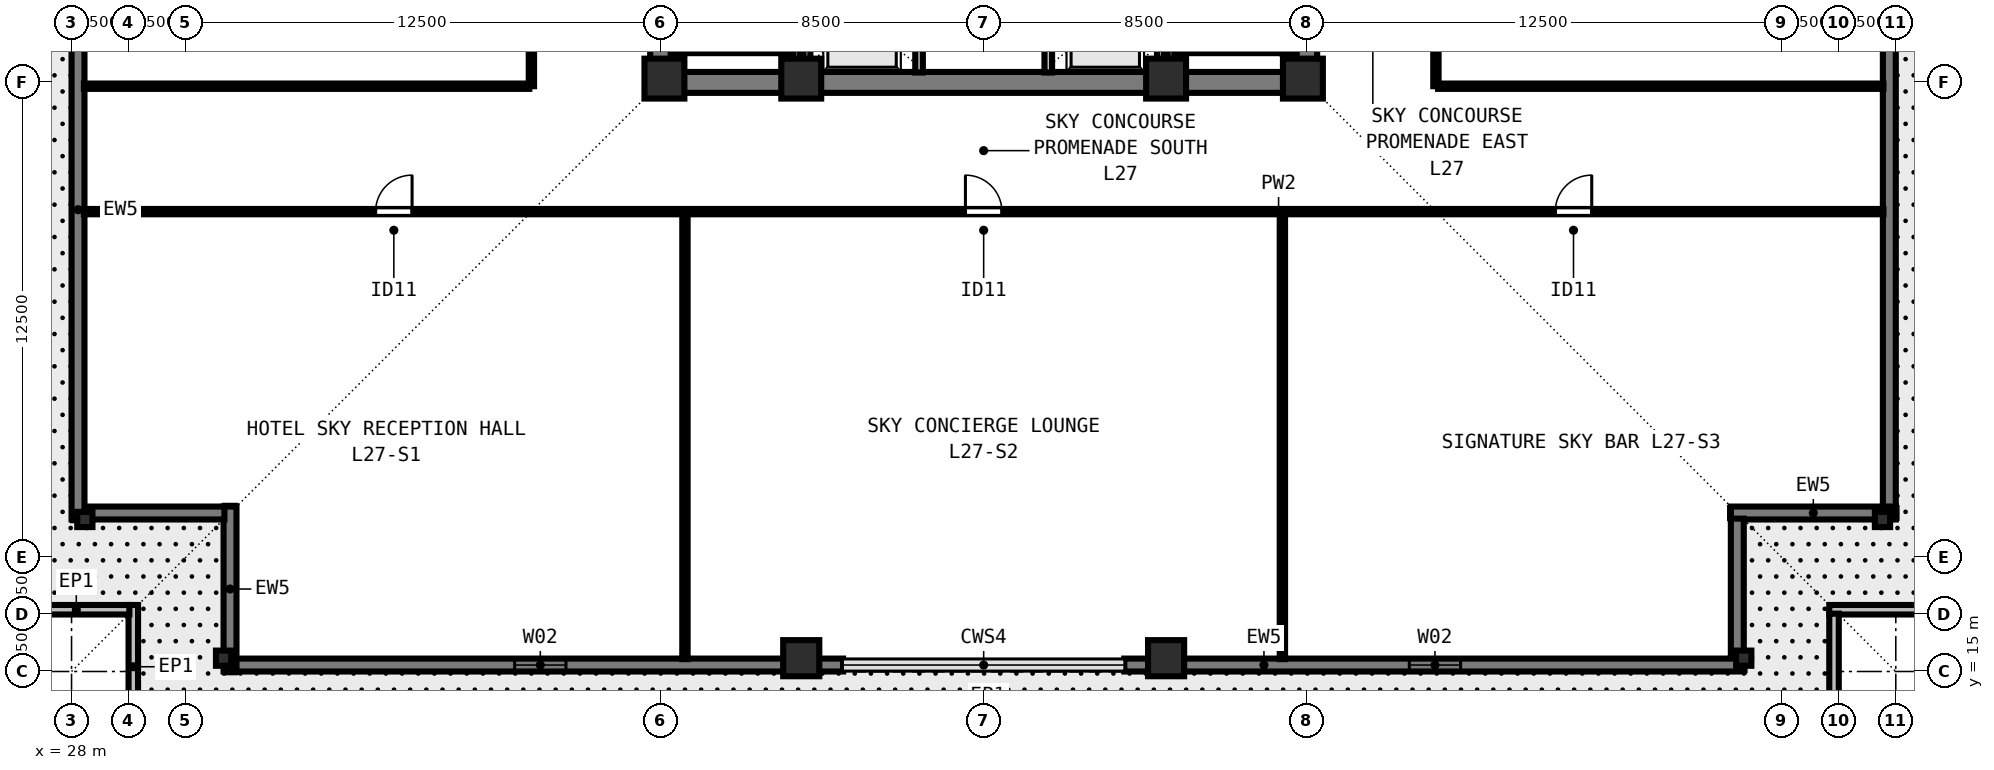
"""IFC4 building model, lengths in metres.
Left out: names, types, materials, properties, quantities, classifications, styles, units other than length and angle.
Written with IfcOpenShell. Run it as: python <this file> out.ifc"""

import sys

from ifc_helpers import new_model, si_unit, direction, frame, frame_2d, origin, origin_2d, place, context, subcontext, project, spatial, rectangle, i_section, extrude, element, fill, save


model = new_model("IFC4")
c1 = context("Model", 3, precision=1e-05, world=origin(), true_north=direction((0.0, 1.0)))
c2 = subcontext(c1, "Body", "Model", "MODEL_VIEW")
j1 = project(units=[si_unit("LENGTHUNIT", "METRE"), si_unit("PLANEANGLEUNIT", "RADIAN")], contexts=[c1])
p1 = place(None, origin())
s1 = spatial("IfcSite", under=j1, at=p1, CompositionType="ELEMENT")
p2 = place(p1, origin())
s2 = spatial("IfcBuilding", under=s1, at=p2, CompositionType="ELEMENT")
p3 = place(p2, frame((0.0, 0.0, 101.5)))
s3 = spatial("IfcBuildingStorey", under=s2, at=p3, CompositionType="ELEMENT", Elevation=101.5)
for number, where, z_axis, x_axis in (
    (1, (43.6, 30.6, 0.0), (0.0, 0.0, 1.0), (1.0, 0.0, 0.0)),
    (2, (47.2, 30.6, 0.0), (0.0, 0.0, 1.0), (1.0, 0.0, 0.0)),
    (3, (56.8, 30.6, 0.0), (0.0, 0.0, 1.0), (1.0, 0.0, 0.0)),
    (4, (60.4, 30.6, 0.0), (0.0, 0.0, 1.0), (1.0, 0.0, 0.0)),
):
    element("IfcColumn", number, at=place(p3, frame(where, z_axis=z_axis, x_axis=x_axis)), inside=s3, PredefinedType="COLUMN", context=c2, shape_type="SweptSolid", body=[
        extrude(rectangle(XDim=1.05, YDim=1.05, at=origin_2d()), origin(), (0.0, 0.0, 1.0), 4.5),
    ])
p4 = place(p3, frame((32.0, 15.35, 0.0), z_axis=(0.0, 0.0, 1.0), x_axis=(1.0, 0.0, 0.0)))
e5 = element("IfcColumn", 5, at=p4, inside=s3, PredefinedType="COLUMN", context=c2, shape_type="SweptSolid", body=[
    extrude(i_section(OverallWidth=0.4, OverallDepth=0.4, WebThickness=0.022, FlangeThickness=0.036, at=origin_2d()), origin(), (0.0, 0.0, 1.0), 4.5),
])
for number, where, z_axis, x_axis in (
    (6, (47.2, 15.35, 0.0), (0.0, 0.0, 1.0), (1.0, 0.0, 0.0)),
    (7, (56.8, 15.35, 0.0), (0.0, 0.0, 1.0), (1.0, 0.0, 0.0)),
):
    element("IfcColumn", number, at=place(p3, frame(where, z_axis=z_axis, x_axis=x_axis)), inside=s3, PredefinedType="COLUMN", context=c2, shape_type="SweptSolid", body=[
        extrude(rectangle(XDim=0.95, YDim=0.95, at=origin_2d()), origin(), (0.0, 0.0, 1.0), 4.5),
    ])
for number, where, z_axis, x_axis in (
    (8, (72.0, 15.35, 0.0), (0.0, 0.0, 1.0), (1.0, 0.0, 0.0)),
    (9, (75.65, 19.0, 0.0), (0.0, 0.0, 1.0), (0.0, 1.0, 0.0)),
    (10, (28.35, 19.0, 0.0), (0.0, 0.0, 1.0), (0.0, 1.0, 0.0)),
):
    element("IfcColumn", number, at=place(p3, frame(where, z_axis=z_axis, x_axis=x_axis)), inside=s3, PredefinedType="COLUMN", context=c2, shape_type="SweptSolid", body=[
        extrude(i_section(OverallWidth=0.4, OverallDepth=0.4, WebThickness=0.022, FlangeThickness=0.036, at=origin_2d()), origin(), (0.0, 0.0, 1.0), 4.5),
    ])
p5 = place(p3, frame((29.625, 13.5, 0.0), z_axis=(0.0, 0.0, 1.0), x_axis=(0.0, 1.0, 0.0)))
e11 = element("IfcWall", 11, at=p5, inside=s3, PredefinedType="PARAPET", context=c2, shape_type="SweptSolid", body=[
    extrude(rectangle(XDim=3.25, YDim=0.25, at=frame_2d((1.625, 0.0))), origin(), (0.0, 0.0, 1.0), 1.15),
])
p6 = place(p3, frame((29.522, 16.625, 0.0), z_axis=(0.0, 0.0, 1.0), x_axis=(-1.0, 0.0, 0.0)))
e12 = element("IfcWall", 12, at=p6, inside=s3, PredefinedType="PARAPET", context=c2, shape_type="SweptSolid", body=[
    extrude(rectangle(XDim=2.794, YDim=0.25, at=frame_2d((1.397, 0.0))), origin(), (0.0, 0.0, 1.0), 1.15),
])
p7 = place(p3, frame((77.5, 16.625, 0.0), z_axis=(0.0, 0.0, 1.0), x_axis=(-1.0, 0.0, 0.0)))
e13 = element("IfcWall", 13, at=p7, inside=s3, PredefinedType="PARAPET", context=c2, shape_type="SweptSolid", body=[
    extrude(rectangle(XDim=3.25, YDim=0.25, at=frame_2d((1.625, 0.0))), origin(), (0.0, 0.0, 1.0), 1.15),
])
p8 = place(p3, frame((74.375, 16.522, 0.0), z_axis=(0.0, 0.0, 1.0), x_axis=(0.0, -1.0, 0.0)))
e14 = element("IfcWall", 14, at=p8, inside=s3, PredefinedType="PARAPET", context=c2, shape_type="SweptSolid", body=[
    extrude(rectangle(XDim=2.794, YDim=0.25, at=frame_2d((1.397, 0.0))), origin(), (0.0, 0.0, 1.0), 1.15),
])
p9 = place(p3, frame((75.83, 35.3, 0.0), z_axis=(0.0, 0.0, 1.0), x_axis=(0.0, -1.0, 0.0)))
e15 = element("IfcWall", 15, at=p9, inside=s3, PredefinedType="SOLIDWALL", context=c2, shape_type="SweptSolid", body=[
    extrude(rectangle(XDim=15.982, YDim=0.34, at=frame_2d((7.991, 0.0))), origin(), (0.0, 0.0, 1.0), 4.28),
])
p10 = place(p3, frame((76.0, 19.17, 0.0), z_axis=(0.0, 0.0, 1.0), x_axis=(-1.0, 0.0, 0.0)))
e16 = element("IfcWall", 16, at=p10, inside=s3, PredefinedType="SOLIDWALL", context=c2, shape_type="SweptSolid", body=[
    extrude(rectangle(XDim=4.34, YDim=0.34, at=frame_2d((2.17, 0.0))), origin(), (0.0, 0.0, 1.0), 4.28),
])
p11 = place(p3, frame((71.83, 19.022, 0.0), z_axis=(0.0, 0.0, 1.0), x_axis=(0.0, -1.0, 0.0)))
e17 = element("IfcWall", 17, at=p11, inside=s3, PredefinedType="SOLIDWALL", context=c2, shape_type="SweptSolid", body=[
    extrude(rectangle(XDim=3.704, YDim=0.34, at=frame_2d((1.852, 0.0))), origin(), (0.0, 0.0, 1.0), 4.28),
])
p12 = place(p3, frame((72.0, 15.17, 0.0), z_axis=(0.0, 0.0, 1.0), x_axis=(-1.0, 0.0, 0.0)))
e18 = element("IfcWall", 18, at=p12, inside=s3, PredefinedType="SOLIDWALL", context=c2, shape_type="SweptSolid", body=[
    extrude(rectangle(XDim=16.3, YDim=0.34, at=frame_2d((8.15, 0.0))), origin(), (0.0, 0.0, 1.0), 4.28),
])
p13 = place(p12, frame((7.45, 0.0, 0.8)))
e19 = element("IfcOpeningElement", 19, at=p13, cuts=e18, PredefinedType="OPENING", context=c2, shape_type="SweptSolid", body=[
    extrude(rectangle(XDim=1.35, YDim=1.8, at=frame_2d((0.675, 0.9))), frame((0.0, 0.18, 0.0), z_axis=(0.0, -1.0, 0.0), x_axis=(1.0, 0.0, 0.0)), (0.0, 0.0, 1.0), 0.36),
])
p14 = place(p3, frame((48.3, 15.17, 0.0), z_axis=(0.0, 0.0, 1.0), x_axis=(-1.0, 0.0, 0.0)))
e20 = element("IfcWall", 20, at=p14, inside=s3, PredefinedType="SOLIDWALL", context=c2, shape_type="SweptSolid", body=[
    extrude(rectangle(XDim=15.982, YDim=0.34, at=frame_2d((7.991, 0.0))), origin(), (0.0, 0.0, 1.0), 4.28),
])
p15 = place(p14, frame((7.291, 0.0, 0.8)))
e21 = element("IfcOpeningElement", 21, at=p15, cuts=e20, PredefinedType="OPENING", context=c2, shape_type="SweptSolid", body=[
    extrude(rectangle(XDim=1.35, YDim=1.8, at=frame_2d((0.675, 0.9))), frame((0.0, 0.18, 0.0), z_axis=(0.0, -1.0, 0.0), x_axis=(1.0, 0.0, 0.0)), (0.0, 0.0, 1.0), 0.36),
])
p16 = place(p3, frame((32.17, 15.0, 0.0), z_axis=(0.0, 0.0, 1.0), x_axis=(0.0, 1.0, 0.0)))
e22 = element("IfcWall", 22, at=p16, inside=s3, PredefinedType="SOLIDWALL", context=c2, shape_type="SweptSolid", body=[
    extrude(rectangle(XDim=4.34, YDim=0.34, at=frame_2d((2.17, 0.0))), origin(), (0.0, 0.0, 1.0), 4.28),
])
p17 = place(p3, frame((32.022, 19.17, 0.0), z_axis=(0.0, 0.0, 1.0), x_axis=(-1.0, 0.0, 0.0)))
e23 = element("IfcWall", 23, at=p17, inside=s3, PredefinedType="SOLIDWALL", context=c2, shape_type="SweptSolid", body=[
    extrude(rectangle(XDim=3.704, YDim=0.34, at=frame_2d((1.852, 0.0))), origin(), (0.0, 0.0, 1.0), 4.28),
])
p18 = place(p3, frame((28.17, 19.0, 0.0), z_axis=(0.0, 0.0, 1.0), x_axis=(0.0, 1.0, 0.0)))
e24 = element("IfcWall", 24, at=p18, inside=s3, PredefinedType="SOLIDWALL", context=c2, shape_type="SweptSolid", body=[
    extrude(rectangle(XDim=16.3, YDim=0.34, at=frame_2d((8.15, 0.0))), origin(), (0.0, 0.0, 1.0), 4.28),
])
p19 = place(p3, frame((43.225, 30.5, 0.0), z_axis=(0.0, 0.0, 1.0), x_axis=(1.0, 0.0, 0.0)))
e25 = element("IfcWall", 25, at=p19, inside=s3, PredefinedType="SHEAR", context=c2, shape_type="SweptSolid", body=[
    extrude(rectangle(XDim=17.55, YDim=0.55, at=frame_2d((8.775, 0.0))), origin(), (0.0, 0.0, 1.0), 4.28),
])
for number, where, z_axis, x_axis in (
    (26, (43.5, 30.765, 0.0), (0.0, 0.0, 1.0), (0.0, 1.0, 0.0)),
    (27, (60.5, 30.765, 0.0), (0.0, 0.0, 1.0), (0.0, 1.0, 0.0)),
):
    element("IfcWall", number, at=place(p3, frame(where, z_axis=z_axis, x_axis=x_axis)), inside=s3, PredefinedType="SHEAR", context=c2, shape_type="SweptSolid", body=[
        extrude(rectangle(XDim=7.985, YDim=0.55, at=frame_2d((3.993, 0.0))), origin(), (0.0, 0.0, 1.0), 4.28),
    ])
p20 = place(p3, frame((50.3, 30.76, 0.0), z_axis=(0.0, 0.0, 1.0), x_axis=(0.0, 1.0, 0.0)))
e28 = element("IfcWall", 28, at=p20, inside=s3, PredefinedType="SOLIDWALL", context=c2, shape_type="SweptSolid", body=[
    extrude(rectangle(XDim=7.855, YDim=0.2, at=frame_2d((3.927, 0.0))), origin(), (0.0, 0.0, 1.0), 4.28),
])
p21 = place(p20, frame((0.79, 0.0, 0.0)))
e29 = element("IfcOpeningElement", 29, at=p21, cuts=e28, PredefinedType="OPENING", context=c2, shape_type="SweptSolid", body=[
    extrude(rectangle(XDim=1.1, YDim=2.2, at=frame_2d((0.55, 1.1))), frame((0.0, 0.11, 0.0), z_axis=(0.0, -1.0, 0.0), x_axis=(1.0, 0.0, 0.0)), (0.0, 0.0, 1.0), 0.22),
])
p22 = place(p20, frame((3.49, 0.0, 0.0)))
e30 = element("IfcOpeningElement", 30, at=p22, cuts=e28, PredefinedType="OPENING", context=c2, shape_type="SweptSolid", body=[
    extrude(rectangle(XDim=1.1, YDim=2.2, at=frame_2d((0.55, 1.1))), frame((0.0, 0.11, 0.0), z_axis=(0.0, -1.0, 0.0), x_axis=(1.0, 0.0, 0.0)), (0.0, 0.0, 1.0), 0.22),
])
p23 = place(p20, frame((6.19, 0.0, 0.0)))
e31 = element("IfcOpeningElement", 31, at=p23, cuts=e28, PredefinedType="OPENING", context=c2, shape_type="SweptSolid", body=[
    extrude(rectangle(XDim=1.1, YDim=2.2, at=frame_2d((0.55, 1.1))), frame((0.0, 0.11, 0.0), z_axis=(0.0, -1.0, 0.0), x_axis=(1.0, 0.0, 0.0)), (0.0, 0.0, 1.0), 0.22),
])
p24 = place(p3, frame((53.7, 30.76, 0.0), z_axis=(0.0, 0.0, 1.0), x_axis=(0.0, 1.0, 0.0)))
e32 = element("IfcWall", 32, at=p24, inside=s3, PredefinedType="SOLIDWALL", context=c2, shape_type="SweptSolid", body=[
    extrude(rectangle(XDim=7.855, YDim=0.2, at=frame_2d((3.927, 0.0))), origin(), (0.0, 0.0, 1.0), 4.28),
])
p25 = place(p24, frame((0.79, 0.0, 0.0)))
e33 = element("IfcOpeningElement", 33, at=p25, cuts=e32, PredefinedType="OPENING", context=c2, shape_type="SweptSolid", body=[
    extrude(rectangle(XDim=1.1, YDim=2.2, at=frame_2d((0.55, 1.1))), frame((0.0, 0.11, 0.0), z_axis=(0.0, -1.0, 0.0), x_axis=(1.0, 0.0, 0.0)), (0.0, 0.0, 1.0), 0.22),
])
p26 = place(p24, frame((3.49, 0.0, 0.0)))
e34 = element("IfcOpeningElement", 34, at=p26, cuts=e32, PredefinedType="OPENING", context=c2, shape_type="SweptSolid", body=[
    extrude(rectangle(XDim=1.1, YDim=2.2, at=frame_2d((0.55, 1.1))), frame((0.0, 0.11, 0.0), z_axis=(0.0, -1.0, 0.0), x_axis=(1.0, 0.0, 0.0)), (0.0, 0.0, 1.0), 0.22),
])
p27 = place(p24, frame((6.19, 0.0, 0.0)))
e35 = element("IfcOpeningElement", 35, at=p27, cuts=e32, PredefinedType="OPENING", context=c2, shape_type="SweptSolid", body=[
    extrude(rectangle(XDim=1.1, YDim=2.2, at=frame_2d((0.55, 1.1))), frame((0.0, 0.11, 0.0), z_axis=(0.0, -1.0, 0.0), x_axis=(1.0, 0.0, 0.0)), (0.0, 0.0, 1.0), 0.22),
])
for number, where, z_axis, x_axis in (
    (36, (47.35, 30.76, 0.0), (0.0, 0.0, 1.0), (0.0, 1.0, 0.0)),
    (37, (56.65, 30.76, 0.0), (0.0, 0.0, 1.0), (0.0, 1.0, 0.0)),
):
    element("IfcWall", number, at=place(p3, frame(where, z_axis=z_axis, x_axis=x_axis)), inside=s3, PredefinedType="SOLIDWALL", context=c2, shape_type="SweptSolid", body=[
        extrude(rectangle(XDim=7.855, YDim=0.18, at=frame_2d((3.927, 0.0))), origin(), (0.0, 0.0, 1.0), 4.28),
    ])
p28 = place(p3, frame((28.325, 27.1, 0.0), z_axis=(0.0, 0.0, 1.0), x_axis=(1.0, 0.0, 0.0)))
e38 = element("IfcWall", 38, at=p28, inside=s3, PredefinedType="PARTITIONING", context=c2, shape_type="SweptSolid", body=[
    extrude(rectangle(XDim=47.35, YDim=0.14, at=frame_2d((23.675, 0.0))), origin(), (0.0, 0.0, 1.0), 3.896),
])
p29 = place(p28, frame((7.675, 0.0, 0.0)))
e39 = element("IfcOpeningElement", 39, at=p29, cuts=e38, PredefinedType="OPENING", context=c2, shape_type="SweptSolid", body=[
    extrude(rectangle(XDim=0.96, YDim=2.12, at=frame_2d((0.48, 1.06))), frame((0.0, 0.08, 0.0), z_axis=(0.0, -1.0, 0.0), x_axis=(1.0, 0.0, 0.0)), (0.0, 0.0, 1.0), 0.16),
])
p30 = place(p28, frame((23.195, 0.0, 0.0)))
e40 = element("IfcOpeningElement", 40, at=p30, cuts=e38, PredefinedType="OPENING", context=c2, shape_type="SweptSolid", body=[
    extrude(rectangle(XDim=0.96, YDim=2.12, at=frame_2d((0.48, 1.06))), frame((0.0, 0.08, 0.0), z_axis=(0.0, -1.0, 0.0), x_axis=(1.0, 0.0, 0.0)), (0.0, 0.0, 1.0), 0.16),
])
p31 = place(p28, frame((38.715, 0.0, 0.0)))
e41 = element("IfcOpeningElement", 41, at=p31, cuts=e38, PredefinedType="OPENING", context=c2, shape_type="SweptSolid", body=[
    extrude(rectangle(XDim=0.96, YDim=2.12, at=frame_2d((0.48, 1.06))), frame((0.0, 0.08, 0.0), z_axis=(0.0, -1.0, 0.0), x_axis=(1.0, 0.0, 0.0)), (0.0, 0.0, 1.0), 0.16),
])
p32 = place(p3, frame((40.1, 30.4, 0.0), z_axis=(0.0, 0.0, 1.0), x_axis=(0.0, 1.0, 0.0)))
e42 = element("IfcWall", 42, at=p32, inside=s3, PredefinedType="PARTITIONING", context=c2, shape_type="SweptSolid", body=[
    extrude(rectangle(XDim=17.2, YDim=0.14, at=frame_2d((8.6, 0.0))), origin(), (0.0, 0.0, 1.0), 4.28),
])
p33 = place(p32, frame((3.772, 0.0, 0.0)))
e43 = element("IfcOpeningElement", 43, at=p33, cuts=e42, PredefinedType="OPENING", context=c2, shape_type="SweptSolid", body=[
    extrude(rectangle(XDim=0.96, YDim=2.12, at=frame_2d((0.48, 1.06))), frame((0.0, 0.08, 0.0), z_axis=(0.0, -1.0, 0.0), x_axis=(1.0, 0.0, 0.0)), (0.0, 0.0, 1.0), 0.16),
])
p34 = place(p32, frame((12.272, 0.0, 0.0)))
e44 = element("IfcOpeningElement", 44, at=p34, cuts=e42, PredefinedType="OPENING", context=c2, shape_type="SweptSolid", body=[
    extrude(rectangle(XDim=0.96, YDim=2.12, at=frame_2d((0.48, 1.06))), frame((0.0, 0.08, 0.0), z_axis=(0.0, -1.0, 0.0), x_axis=(1.0, 0.0, 0.0)), (0.0, 0.0, 1.0), 0.16),
])
p35 = place(p3, frame((63.9, 30.4, 0.0), z_axis=(0.0, 0.0, 1.0), x_axis=(0.0, 1.0, 0.0)))
e45 = element("IfcWall", 45, at=p35, inside=s3, PredefinedType="PARTITIONING", context=c2, shape_type="SweptSolid", body=[
    extrude(rectangle(XDim=17.2, YDim=0.14, at=frame_2d((8.6, 0.0))), origin(), (0.0, 0.0, 1.0), 4.28),
])
p36 = place(p35, frame((3.968, 0.0, 0.0)))
e46 = element("IfcOpeningElement", 46, at=p36, cuts=e45, PredefinedType="OPENING", context=c2, shape_type="SweptSolid", body=[
    extrude(rectangle(XDim=0.96, YDim=2.12, at=frame_2d((0.48, 1.06))), frame((0.0, 0.08, 0.0), z_axis=(0.0, -1.0, 0.0), x_axis=(1.0, 0.0, 0.0)), (0.0, 0.0, 1.0), 0.16),
])
p37 = place(p35, frame((12.468, 0.0, 0.0)))
e47 = element("IfcOpeningElement", 47, at=p37, cuts=e45, PredefinedType="OPENING", context=c2, shape_type="SweptSolid", body=[
    extrude(rectangle(XDim=0.96, YDim=2.12, at=frame_2d((0.48, 1.06))), frame((0.0, 0.08, 0.0), z_axis=(0.0, -1.0, 0.0), x_axis=(1.0, 0.0, 0.0)), (0.0, 0.0, 1.0), 0.16),
])
for number, where, z_axis, x_axis in (
    (48, (28.325, 30.4, 0.0), (0.0, 0.0, 1.0), (1.0, 0.0, 0.0)),
    (49, (63.955, 30.4, 0.0), (0.0, 0.0, 1.0), (1.0, 0.0, 0.0)),
):
    element("IfcWall", number, at=place(p3, frame(where, z_axis=z_axis, x_axis=x_axis)), inside=s3, PredefinedType="PARTITIONING", context=c2, shape_type="SweptSolid", body=[
        extrude(rectangle(XDim=11.72, YDim=0.14, at=frame_2d((5.86, 0.0))), origin(), (0.0, 0.0, 1.0), 4.28),
    ])
for number, where, z_axis, x_axis in (
    (50, (44.14, 15.325, 0.0), (0.0, 0.0, 1.0), (0.0, 1.0, 0.0)),
    (51, (59.86, 15.325, 0.0), (0.0, 0.0, 1.0), (0.0, 1.0, 0.0)),
):
    element("IfcWall", number, at=place(p3, frame(where, z_axis=z_axis, x_axis=x_axis)), inside=s3, PredefinedType="PARTITIONING", context=c2, shape_type="SweptSolid", body=[
        extrude(rectangle(XDim=11.675, YDim=0.14, at=frame_2d((5.837, 0.0))), origin(), (0.0, 0.0, 1.0), 4.28),
    ])
p38 = place(p3, frame((43.765, 31.36, 0.0), z_axis=(0.0, 0.0, 1.0), x_axis=(1.0, 0.0, 0.0)))
e52 = element("IfcWall", 52, at=p38, inside=s3, PredefinedType="SOLIDWALL", context=c2, shape_type="SweptSolid", body=[
    extrude(rectangle(XDim=3.23, YDim=0.18, at=frame_2d((1.615, 0.0))), origin(), (0.0, 0.0, 1.0), 4.28),
])
p39 = place(p3, frame((47.07, 38.78, 0.0), z_axis=(0.0, 0.0, 1.0), x_axis=(0.0, -1.0, 0.0)))
e53 = element("IfcWall", 53, at=p39, inside=s3, PredefinedType="SOLIDWALL", context=c2, shape_type="SweptSolid", body=[
    extrude(rectangle(XDim=8.017, YDim=0.18, at=frame_2d((4.009, 0.0))), origin(), (0.0, 0.0, 1.0), 4.28),
])
p40 = place(p3, frame((57.005, 31.36, 0.0), z_axis=(0.0, 0.0, 1.0), x_axis=(1.0, 0.0, 0.0)))
e54 = element("IfcWall", 54, at=p40, inside=s3, PredefinedType="SOLIDWALL", context=c2, shape_type="SweptSolid", body=[
    extrude(rectangle(XDim=3.23, YDim=0.18, at=frame_2d((1.615, 0.0))), origin(), (0.0, 0.0, 1.0), 4.28),
])
p41 = place(p3, frame((56.93, 38.78, 0.0), z_axis=(0.0, 0.0, 1.0), x_axis=(0.0, -1.0, 0.0)))
e55 = element("IfcWall", 55, at=p41, inside=s3, PredefinedType="SOLIDWALL", context=c2, shape_type="SweptSolid", body=[
    extrude(rectangle(XDim=8.017, YDim=0.18, at=frame_2d((4.009, 0.0))), origin(), (0.0, 0.0, 1.0), 4.28),
])
p42 = place(p13, origin())
e56 = element("IfcWindow", 56, at=p42, inside=s3, PartitioningType="SINGLE_PANEL", PredefinedType="WINDOW", context=c2, shape_type="SweptSolid", body=[
    extrude(rectangle(XDim=1.35, YDim=1.8, at=frame_2d((0.675, 0.9))), frame((0.0, -0.04, 0.0), z_axis=(0.0, -1.0, 0.0), x_axis=(1.0, 0.0, 0.0)), (0.0, 0.0, 1.0), 0.06),
])
fill(e19, e56)
p43 = place(p15, origin())
e57 = element("IfcWindow", 57, at=p43, inside=s3, PartitioningType="SINGLE_PANEL", PredefinedType="WINDOW", context=c2, shape_type="SweptSolid", body=[
    extrude(rectangle(XDim=1.35, YDim=1.8, at=frame_2d((0.675, 0.9))), frame((0.0, -0.04, 0.0), z_axis=(0.0, -1.0, 0.0), x_axis=(1.0, 0.0, 0.0)), (0.0, 0.0, 1.0), 0.06),
])
fill(e21, e57)
p44 = place(p29, origin())
e58 = element("IfcDoor", 58, at=p44, inside=s3, OperationType="SINGLE_SWING_RIGHT", PredefinedType="DOOR", context=c2, shape_type="SweptSolid", body=[
    extrude(rectangle(XDim=0.96, YDim=2.12, at=frame_2d((0.48, 1.06))), frame((0.0, 0.025, 0.0), z_axis=(0.0, -1.0, 0.0), x_axis=(1.0, 0.0, 0.0)), (0.0, 0.0, 1.0), 0.05),
])
fill(e39, e58)
p45 = place(p30, origin())
e59 = element("IfcDoor", 59, at=p45, inside=s3, OperationType="SINGLE_SWING_LEFT", PredefinedType="DOOR", context=c2, shape_type="SweptSolid", body=[
    extrude(rectangle(XDim=0.96, YDim=2.12, at=frame_2d((0.48, 1.06))), frame((0.0, 0.025, 0.0), z_axis=(0.0, -1.0, 0.0), x_axis=(1.0, 0.0, 0.0)), (0.0, 0.0, 1.0), 0.05),
])
fill(e40, e59)
p46 = place(p31, origin())
e60 = element("IfcDoor", 60, at=p46, inside=s3, OperationType="SINGLE_SWING_RIGHT", PredefinedType="DOOR", context=c2, shape_type="SweptSolid", body=[
    extrude(rectangle(XDim=0.96, YDim=2.12, at=frame_2d((0.48, 1.06))), frame((0.0, 0.025, 0.0), z_axis=(0.0, -1.0, 0.0), x_axis=(1.0, 0.0, 0.0)), (0.0, 0.0, 1.0), 0.05),
])
fill(e41, e60)
save(model, sys.argv[1])
